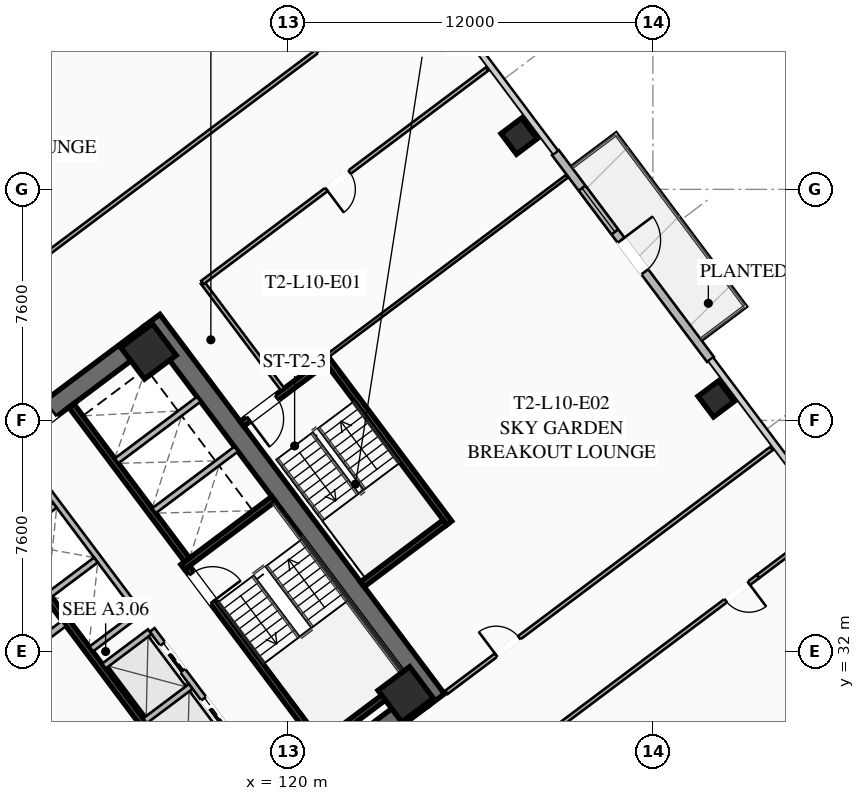
"""IFC4 building model, lengths in metres.
Left out: names, types, materials, properties, quantities, classifications, styles, units other than length and angle.
Written with IfcOpenShell. Run it as: python <this file> out.ifc"""

import sys

from ifc_helpers import new_model, si_unit, direction, frame, frame_2d, origin, origin_2d, place, context, subcontext, project, spatial, rectangle, hollow_rectangle, extrude, element, fill, save


model = new_model("IFC4")
c1 = context("Model", 3, precision=1e-05, world=origin(), true_north=direction((0.0, 1.0)))
c2 = subcontext(c1, "Body", "Model", "MODEL_VIEW")
j1 = project(units=[si_unit("LENGTHUNIT", "METRE"), si_unit("PLANEANGLEUNIT", "RADIAN")], contexts=[c1])
p1 = place(None, origin())
s1 = spatial("IfcSite", under=j1, at=p1, CompositionType="ELEMENT")
p2 = place(p1, origin())
s2 = spatial("IfcBuilding", under=s1, at=p2, CompositionType="ELEMENT")
p3 = place(p2, frame((0.0, 0.0, 42.35)))
s3 = spatial("IfcBuildingStorey", under=s2, at=p3, CompositionType="ELEMENT", Elevation=42.35)
for number, where, z_axis, x_axis in (
    (1, (112.476, 21.107, 0.0), (0.0, 0.0, 1.0), (-0.6, 0.8, 0.0)),
    (2, (115.524, 42.893, 0.0), (0.0, 0.0, 1.0), (0.6, -0.8, 0.0)),
):
    element("IfcWall", number, at=place(p3, frame(where, z_axis=z_axis, x_axis=x_axis)), inside=s3, PredefinedType="SHEAR", context=c2, shape_type="SweptSolid", body=[
        extrude(rectangle(XDim=15.6, YDim=0.65, at=frame_2d((7.8, 0.0))), origin(), (0.0, 0.0, 1.0), 3.55),
    ])
p4 = place(p3, frame((124.429, 30.478, 0.0), z_axis=(0.0, 0.0, 1.0), x_axis=(-0.799998028465, -0.600002628705, 0.0)))
e3 = element("IfcWall", 3, at=p4, inside=s3, PredefinedType="SHEAR", context=c2, shape_type="SweptSolid", body=[
    extrude(rectangle(XDim=14.86, YDim=0.65, at=frame_2d((7.43, 0.0))), origin(), (0.0, 0.0, 1.0), 3.55),
])
p5 = place(p4, frame((9.13, 0.0, 0.0)))
e4 = element("IfcOpeningElement", 4, at=p5, cuts=e3, PredefinedType="OPENING", context=c2, shape_type="SweptSolid", body=[
    extrude(rectangle(XDim=1.25, YDim=2.25, at=frame_2d((0.625, 1.125))), frame((0.0, 0.335, 0.0), z_axis=(0.0, -1.0, 0.0), x_axis=(1.0, 0.0, 0.0)), (0.0, 0.0, 1.0), 0.67),
])
p6 = place(p4, frame((4.08, 0.0, 0.0)))
e5 = element("IfcOpeningElement", 5, at=p6, cuts=e3, PredefinedType="OPENING", context=c2, shape_type="SweptSolid", body=[
    extrude(rectangle(XDim=1.25, YDim=2.25, at=frame_2d((0.625, 1.125))), frame((0.0, 0.335, 0.0), z_axis=(0.0, -1.0, 0.0), x_axis=(1.0, 0.0, 0.0)), (0.0, 0.0, 1.0), 0.67),
])
p7 = place(p3, frame((103.571, 33.522, 0.0), z_axis=(0.0, 0.0, 1.0), x_axis=(0.799998028465, 0.600002628705, 0.0)))
e6 = element("IfcWall", 6, at=p7, inside=s3, PredefinedType="SHEAR", context=c2, shape_type="SweptSolid", body=[
    extrude(rectangle(XDim=14.86, YDim=0.65, at=frame_2d((7.43, 0.0))), origin(), (0.0, 0.0, 1.0), 3.55),
])
p8 = place(p7, frame((4.48, 0.0, 0.0)))
e7 = element("IfcOpeningElement", 7, at=p8, cuts=e6, PredefinedType="OPENING", context=c2, shape_type="SweptSolid", body=[
    extrude(rectangle(XDim=1.25, YDim=2.25, at=frame_2d((0.625, 1.125))), frame((0.0, 0.335, 0.0), z_axis=(0.0, -1.0, 0.0), x_axis=(1.0, 0.0, 0.0)), (0.0, 0.0, 1.0), 0.67),
])
p9 = place(p7, frame((9.53, 0.0, 0.0)))
e8 = element("IfcOpeningElement", 8, at=p9, cuts=e6, PredefinedType="OPENING", context=c2, shape_type="SweptSolid", body=[
    extrude(rectangle(XDim=1.25, YDim=2.25, at=frame_2d((0.625, 1.125))), frame((0.0, 0.335, 0.0), z_axis=(0.0, -1.0, 0.0), x_axis=(1.0, 0.0, 0.0)), (0.0, 0.0, 1.0), 0.67),
])
for number, where, z_axis, x_axis in (
    (9, (123.87, 30.59, 0.0), (0.0, 0.0, 1.0), (0.8, 0.6, 0.0)),
    (10, (115.41, 41.87, 0.0), (0.0, 0.0, 1.0), (0.8, 0.6, 0.0)),
):
    element("IfcColumn", number, at=place(p3, frame(where, z_axis=z_axis, x_axis=x_axis)), inside=s3, PredefinedType="COLUMN", context=c2, shape_type="SweptSolid", body=[
        extrude(hollow_rectangle(XDim=1.3, YDim=1.3, WallThickness=0.05, at=origin_2d()), origin(), (0.0, 0.0, 1.0), 3.35),
    ])
for number, where, z_axis, x_axis in (
    (11, (134.08, 40.31, 0.0), (0.0, 0.0, 1.0), (0.8, 0.6, 0.0)),
    (12, (127.6, 48.95, 0.0), (0.0, 0.0, 1.0), (0.8, 0.6, 0.0)),
):
    element("IfcColumn", number, at=place(p3, frame(where, z_axis=z_axis, x_axis=x_axis)), inside=s3, PredefinedType="COLUMN", context=c2, shape_type="SweptSolid", body=[
        extrude(hollow_rectangle(XDim=0.85, YDim=0.85, WallThickness=0.035, at=origin_2d()), origin(), (0.0, 0.0, 1.0), 3.35),
    ])
p10 = place(p3, frame((128.794, 48.408, 0.0), z_axis=(0.0, 0.0, 1.0), x_axis=(0.600004595526, -0.799996553335, 0.0)))
e13 = element("IfcWall", 13, at=p10, inside=s3, PredefinedType="SOLIDWALL", context=c2, shape_type="SweptSolid", body=[
    extrude(rectangle(XDim=8.5, YDim=0.28, at=frame_2d((4.25, 0.0))), origin(), (0.0, 0.0, 1.0), 3.35),
])
p11 = place(p10, frame((3.6, 0.0, 0.0)))
e14 = element("IfcOpeningElement", 14, at=p11, cuts=e13, PredefinedType="OPENING", context=c2, shape_type="SweptSolid", body=[
    extrude(rectangle(XDim=1.3, YDim=2.15, at=frame_2d((0.65, 1.075))), frame((0.0, 0.15, 0.0), z_axis=(0.0, -1.0, 0.0), x_axis=(1.0, 0.0, 0.0)), (0.0, 0.0, 1.0), 0.3),
])
p12 = place(p10, frame((1.46, 0.0, 0.85)))
e15 = element("IfcOpeningElement", 15, at=p12, cuts=e13, PredefinedType="OPENING", context=c2, shape_type="SweptSolid", body=[
    extrude(rectangle(XDim=1.8, YDim=1.92, at=frame_2d((0.9, 0.96))), frame((0.0, 0.15, 0.0), z_axis=(0.0, -1.0, 0.0), x_axis=(1.0, 0.0, 0.0)), (0.0, 0.0, 1.0), 0.3),
])
p13 = place(p3, frame((116.56, 34.92, 0.0), z_axis=(0.0, 0.0, 1.0), x_axis=(0.600009827119, -0.799992629566, 0.0)))
e16 = element("IfcWall", 16, at=p13, inside=s3, PredefinedType="SHEAR", context=c2, shape_type="SweptSolid", body=[
    extrude(rectangle(XDim=7.95, YDim=0.2, at=frame_2d((3.975, 0.0))), origin(), (0.0, 0.0, 1.0), 3.35),
])
p14 = place(p13, frame((0.45, 0.0, 0.0)))
e17 = element("IfcOpeningElement", 17, at=p14, cuts=e16, PredefinedType="OPENING", context=c2, shape_type="SweptSolid", body=[
    extrude(rectangle(XDim=1.15, YDim=2.2, at=frame_2d((0.575, 1.1))), frame((0.0, 0.11, 0.0), z_axis=(0.0, -1.0, 0.0), x_axis=(1.0, 0.0, 0.0)), (0.0, 0.0, 1.0), 0.22),
])
for number, where, z_axis, x_axis in (
    (18, (116.54, 34.78, 0.0), (0.0, 0.0, 1.0), (0.8, 0.6, 0.0)),
    (19, (120.98, 28.86, 0.0), (0.0, 0.0, 1.0), (0.8, 0.6, 0.0)),
):
    element("IfcWall", number, at=place(p3, frame(where, z_axis=z_axis, x_axis=x_axis)), inside=s3, PredefinedType="SHEAR", context=c2, shape_type="SweptSolid", body=[
        extrude(rectangle(XDim=3.73, YDim=0.2, at=frame_2d((1.865, 0.0))), origin(), (0.0, 0.0, 1.0), 3.35),
    ])
p15 = place(p3, frame((117.938, 26.016, 0.0), z_axis=(0.0, 0.0, 1.0), x_axis=(-0.600005463273, 0.799995902516, 0.0)))
e20 = element("IfcWall", 20, at=p15, inside=s3, PredefinedType="SHEAR", context=c2, shape_type="SweptSolid", body=[
    extrude(rectangle(XDim=14.3, YDim=0.2, at=frame_2d((7.15, 0.0))), origin(), (0.0, 0.0, 1.0), 3.35),
])
p16 = place(p3, frame((110.104, 31.028, 0.0), z_axis=(0.0, 0.0, 1.0), x_axis=(0.800018601094, 0.59997519774, 0.0)))
e21 = element("IfcWall", 21, at=p16, inside=s3, PredefinedType="SOLIDWALL", context=c2, shape_type="SweptSolid", body=[
    extrude(rectangle(XDim=3.15, YDim=0.22, at=frame_2d((1.575, 0.0))), origin(), (0.0, 0.0, 1.0), 2.703),
])
p17 = place(p16, frame((1.1, 0.0, 0.0)))
e22 = element("IfcOpeningElement", 22, at=p17, cuts=e21, PredefinedType="OPENING", context=c2, shape_type="SweptSolid", body=[
    extrude(rectangle(XDim=0.95, YDim=2.05, at=frame_2d((0.475, 1.025))), frame((0.0, 0.12, 0.0), z_axis=(0.0, -1.0, 0.0), x_axis=(1.0, 0.0, 0.0)), (0.0, 0.0, 1.0), 0.24),
])
p18 = place(p3, frame((112.87, 40.09, 0.0), z_axis=(0.0, 0.0, 1.0), x_axis=(0.599975393228, -0.800018454488, 0.0)))
e23 = element("IfcWall", 23, at=p18, inside=s3, PredefinedType="SHEAR", context=c2, shape_type="SweptSolid", body=[
    extrude(rectangle(XDim=6.35, YDim=0.2, at=frame_2d((3.175, 0.0))), origin(), (0.0, 0.0, 1.0), 3.35),
])
for number, where, z_axis, x_axis in (
    (24, (115.59, 36.63, 0.0), (0.0, 0.0, 1.0), (0.8, 0.6, 0.0)),
    (25, (114.36, 38.27, 0.0), (0.0, 0.0, 1.0), (0.8, 0.6, 0.0)),
):
    element("IfcWall", number, at=place(p3, frame(where, z_axis=z_axis, x_axis=x_axis)), inside=s3, PredefinedType="SOLIDWALL", context=c2, shape_type="SweptSolid", body=[
        extrude(rectangle(XDim=3.38, YDim=0.2, at=frame_2d((1.69, 0.0))), origin(), (0.0, 0.0, 1.0), 3.35),
    ])
p19 = place(p3, frame((119.61, 27.27, 0.0), z_axis=(0.0, 0.0, 1.0), x_axis=(-0.600011488909, 0.79999138319, 0.0)))
e26 = element("IfcWall", 26, at=p19, inside=s3, PredefinedType="SOLIDWALL", context=c2, shape_type="SweptSolid", body=[
    extrude(rectangle(XDim=6.8, YDim=0.2, at=frame_2d((3.4, 0.0))), origin(), (0.0, 0.0, 1.0), 3.35),
])
p20 = place(p19, frame((0.625, 0.0, 0.0)))
e27 = element("IfcOpeningElement", 27, at=p20, cuts=e26, PredefinedType="OPENING", context=c2, shape_type="SweptSolid", body=[
    extrude(rectangle(XDim=1.1, YDim=2.2, at=frame_2d((0.55, 1.1))), frame((0.0, 0.11, 0.0), z_axis=(0.0, -1.0, 0.0), x_axis=(1.0, 0.0, 0.0)), (0.0, 0.0, 1.0), 0.22),
])
p21 = place(p19, frame((2.875, 0.0, 0.0)))
e28 = element("IfcOpeningElement", 28, at=p21, cuts=e26, PredefinedType="OPENING", context=c2, shape_type="SweptSolid", body=[
    extrude(rectangle(XDim=1.1, YDim=2.2, at=frame_2d((0.55, 1.1))), frame((0.0, 0.11, 0.0), z_axis=(0.0, -1.0, 0.0), x_axis=(1.0, 0.0, 0.0)), (0.0, 0.0, 1.0), 0.22),
])
p22 = place(p19, frame((5.125, 0.0, 0.0)))
e29 = element("IfcOpeningElement", 29, at=p22, cuts=e26, PredefinedType="OPENING", context=c2, shape_type="SweptSolid", body=[
    extrude(rectangle(XDim=1.1, YDim=2.2, at=frame_2d((0.55, 1.1))), frame((0.0, 0.11, 0.0), z_axis=(0.0, -1.0, 0.0), x_axis=(1.0, 0.0, 0.0)), (0.0, 0.0, 1.0), 0.22),
])
p23 = place(p3, frame((115.296, 29.722, 0.0), z_axis=(0.0, 0.0, 1.0), x_axis=(0.799984418148, 0.600020775241, 0.0)))
e30 = element("IfcWall", 30, at=p23, inside=s3, PredefinedType="SOLIDWALL", context=c2, shape_type="SweptSolid", body=[
    extrude(rectangle(XDim=1.88, YDim=0.2, at=frame_2d((0.94, 0.0))), origin(), (0.0, 0.0, 1.0), 3.35),
])
p24 = place(p3, frame((113.946, 31.522, 0.0), z_axis=(0.0, 0.0, 1.0), x_axis=(0.8, 0.6, 0.0)))
e31 = element("IfcWall", 31, at=p24, inside=s3, PredefinedType="SOLIDWALL", context=c2, shape_type="SweptSolid", body=[
    extrude(rectangle(XDim=1.88, YDim=0.2, at=frame_2d((0.94, 0.0))), origin(), (0.0, 0.0, 1.0), 3.35),
])
p25 = place(p3, frame((115.11, 33.27, 0.0), z_axis=(0.0, 0.0, 1.0), x_axis=(-0.600011488909, 0.79999138319, 0.0)))
e32 = element("IfcWall", 32, at=p25, inside=s3, PredefinedType="SOLIDWALL", context=c2, shape_type="SweptSolid", body=[
    extrude(rectangle(XDim=6.8, YDim=0.2, at=frame_2d((3.4, 0.0))), origin(), (0.0, 0.0, 1.0), 3.35),
])
p26 = place(p3, frame((113.526, 32.082, 0.0), z_axis=(0.0, 0.0, 1.0), x_axis=(0.800046745961, 0.599937666993, 0.0)))
e33 = element("IfcWall", 33, at=p26, inside=s3, PredefinedType="SOLIDWALL", context=c2, shape_type="SweptSolid", body=[
    extrude(rectangle(XDim=1.88, YDim=0.2, at=frame_2d((0.94, 0.0))), origin(), (0.0, 0.0, 1.0), 3.35),
])
p27 = place(p3, frame((112.176, 33.882, 0.0), z_axis=(0.0, 0.0, 1.0), x_axis=(0.8, 0.6, 0.0)))
e34 = element("IfcWall", 34, at=p27, inside=s3, PredefinedType="SOLIDWALL", context=c2, shape_type="SweptSolid", body=[
    extrude(rectangle(XDim=1.88, YDim=0.2, at=frame_2d((0.94, 0.0))), origin(), (0.0, 0.0, 1.0), 3.35),
])
p28 = place(p3, frame((110.826, 35.682, 0.0), z_axis=(0.0, 0.0, 1.0), x_axis=(0.799984418148, 0.600020775241, 0.0)))
e35 = element("IfcWall", 35, at=p28, inside=s3, PredefinedType="SOLIDWALL", context=c2, shape_type="SweptSolid", body=[
    extrude(rectangle(XDim=1.88, YDim=0.2, at=frame_2d((0.94, 0.0))), origin(), (0.0, 0.0, 1.0), 3.35),
])
p29 = place(p3, frame((125.304, 36.228, 0.0), z_axis=(0.0, 0.0, 1.0), x_axis=(-0.59998851072, 0.800008616831, 0.0)))
e36 = element("IfcWall", 36, at=p29, inside=s3, PredefinedType="SHEAR", context=c2, shape_type="SweptSolid", body=[
    extrude(rectangle(XDim=6.8, YDim=0.2, at=frame_2d((3.4, 0.0))), origin(), (0.0, 0.0, 1.0), 3.35),
])
p30 = place(p3, frame((121.204, 41.528, 0.0), z_axis=(0.0, 0.0, 1.0), x_axis=(-0.800017232136, -0.599977023131, 0.0)))
e37 = element("IfcWall", 37, at=p30, inside=s3, PredefinedType="SHEAR", context=c2, shape_type="SweptSolid", body=[
    extrude(rectangle(XDim=3.4, YDim=0.2, at=frame_2d((1.7, 0.0))), origin(), (0.0, 0.0, 1.0), 3.35),
])
p31 = place(p30, frame((1.975, 0.0, 0.0)))
e38 = element("IfcOpeningElement", 38, at=p31, cuts=e37, PredefinedType="OPENING", context=c2, shape_type="SweptSolid", body=[
    extrude(rectangle(XDim=1.15, YDim=2.2, at=frame_2d((0.575, 1.1))), frame((0.0, 0.11, 0.0), z_axis=(0.0, -1.0, 0.0), x_axis=(1.0, 0.0, 0.0)), (0.0, 0.0, 1.0), 0.22),
])
p32 = place(p3, frame((122.444, 34.208, 0.0), z_axis=(0.0, 0.0, 1.0), x_axis=(0.79999138319, 0.600011488909, 0.0)))
e39 = element("IfcWall", 39, at=p32, inside=s3, PredefinedType="SHEAR", context=c2, shape_type="SweptSolid", body=[
    extrude(rectangle(XDim=3.4, YDim=0.2, at=frame_2d((1.7, 0.0))), origin(), (0.0, 0.0, 1.0), 3.35),
])
p33 = place(p3, frame((119.824, 40.618, 0.0), z_axis=(0.0, 0.0, 1.0), x_axis=(-0.599982243973, 0.800013316712, 0.0)))
e40 = element("IfcWall", 40, at=p33, inside=s3, PredefinedType="PARTITIONING", context=c2, shape_type="SweptSolid", body=[
    extrude(rectangle(XDim=4.4, YDim=0.135, at=frame_2d((2.2, 0.0))), origin(), (0.0, 0.0, 1.0), 2.703),
])
p34 = place(p3, frame((98.084, 34.588, 0.0), z_axis=(0.0, 0.0, 1.0), x_axis=(0.799997053619, 0.600003928488, 0.0)))
e41 = element("IfcWall", 41, at=p34, inside=s3, PredefinedType="PARTITIONING", context=c2, shape_type="SweptSolid", body=[
    extrude(rectangle(XDim=29.83, YDim=0.135, at=frame_2d((14.915, 0.0))), origin(), (0.0, 0.0, 1.0), 2.703),
])
p35 = place(p34, frame((0.3, 0.0, 0.0)))
e42 = element("IfcOpeningElement", 42, at=p35, cuts=e41, PredefinedType="OPENING", context=c2, shape_type="SweptSolid", body=[
    extrude(rectangle(XDim=0.95, YDim=2.05, at=frame_2d((0.475, 1.025))), frame((0.0, 0.077, 0.0), z_axis=(0.0, -1.0, 0.0), x_axis=(1.0, 0.0, 0.0)), (0.0, 0.0, 1.0), 0.155),
])
p36 = place(p34, frame((28.58, 0.0, 0.0)))
e43 = element("IfcOpeningElement", 43, at=p36, cuts=e41, PredefinedType="OPENING", context=c2, shape_type="SweptSolid", body=[
    extrude(rectangle(XDim=0.95, YDim=2.05, at=frame_2d((0.475, 1.025))), frame((0.0, 0.077, 0.0), z_axis=(0.0, -1.0, 0.0), x_axis=(1.0, 0.0, 0.0)), (0.0, 0.0, 1.0), 0.155),
])
p37 = place(p3, frame((135.46, 34.47, 0.0), z_axis=(0.0, 0.0, 1.0), x_axis=(-0.800000982127, -0.599998690494, 0.0)))
e44 = element("IfcWall", 44, at=p37, inside=s3, PredefinedType="PARTITIONING", context=c2, shape_type="SweptSolid", body=[
    extrude(rectangle(XDim=29.83, YDim=0.135, at=frame_2d((14.915, 0.0))), origin(), (0.0, 0.0, 1.0), 2.703),
])
p38 = place(p37, frame((28.5, 0.0, 0.0)))
e45 = element("IfcOpeningElement", 45, at=p38, cuts=e44, PredefinedType="OPENING", context=c2, shape_type="SweptSolid", body=[
    extrude(rectangle(XDim=0.95, YDim=2.05, at=frame_2d((0.475, 1.025))), frame((0.0, 0.077, 0.0), z_axis=(0.0, -1.0, 0.0), x_axis=(1.0, 0.0, 0.0)), (0.0, 0.0, 1.0), 0.155),
])
p39 = place(p37, frame((17.901, 0.0, 0.0)))
e46 = element("IfcOpeningElement", 46, at=p39, cuts=e44, PredefinedType="OPENING", context=c2, shape_type="SweptSolid", body=[
    extrude(rectangle(XDim=0.95, YDim=2.05, at=frame_2d((0.475, 1.025))), frame((0.0, 0.077, 0.0), z_axis=(0.0, -1.0, 0.0), x_axis=(1.0, 0.0, 0.0)), (0.0, 0.0, 1.0), 0.155),
])
p40 = place(p37, frame((13.92, 0.0, 0.0)))
e47 = element("IfcOpeningElement", 47, at=p40, cuts=e44, PredefinedType="OPENING", context=c2, shape_type="SweptSolid", body=[
    extrude(rectangle(XDim=0.95, YDim=2.05, at=frame_2d((0.475, 1.025))), frame((0.0, 0.077, 0.0), z_axis=(0.0, -1.0, 0.0), x_axis=(1.0, 0.0, 0.0)), (0.0, 0.0, 1.0), 0.155),
])
p41 = place(p37, frame((0.38, 0.0, 0.0)))
e48 = element("IfcOpeningElement", 48, at=p41, cuts=e44, PredefinedType="OPENING", context=c2, shape_type="SweptSolid", body=[
    extrude(rectangle(XDim=0.95, YDim=2.05, at=frame_2d((0.475, 1.025))), frame((0.0, 0.077, 0.0), z_axis=(0.0, -1.0, 0.0), x_axis=(1.0, 0.0, 0.0)), (0.0, 0.0, 1.0), 0.155),
])
p42 = place(p3, frame((135.46, 34.47, 0.0), z_axis=(0.0, 0.0, 1.0), x_axis=(0.799990331366, 0.600012891296, 0.0)))
e49 = element("IfcWall", 49, at=p42, inside=s3, PredefinedType="PARTITIONING", context=c2, shape_type="SweptSolid", body=[
    extrude(rectangle(XDim=3.03, YDim=0.135, at=frame_2d((1.515, 0.0))), origin(), (0.0, 0.0, 1.0), 2.703),
])
p43 = place(p3, frame((126.544, 51.158, 0.0), z_axis=(0.0, 0.0, 1.0), x_axis=(-0.799994991918, -0.600006677385, 0.0)))
e50 = element("IfcWall", 50, at=p43, inside=s3, PredefinedType="PARTITIONING", context=c2, shape_type="SweptSolid", body=[
    extrude(rectangle(XDim=11.7, YDim=0.135, at=frame_2d((5.85, 0.0))), origin(), (0.0, 0.0, 1.0), 2.703),
])
p44 = place(p43, frame((5.65, 0.0, 0.0)))
e51 = element("IfcOpeningElement", 51, at=p44, cuts=e50, PredefinedType="OPENING", context=c2, shape_type="SweptSolid", body=[
    extrude(rectangle(XDim=0.95, YDim=2.05, at=frame_2d((0.475, 1.025))), frame((0.0, 0.077, 0.0), z_axis=(0.0, -1.0, 0.0), x_axis=(1.0, 0.0, 0.0)), (0.0, 0.0, 1.0), 0.155),
])
p45 = place(p3, frame((125.208, 30.656, 0.0), z_axis=(0.0, 0.0, 1.0), x_axis=(0.800002191231, 0.599997078347, 0.0)))
e52 = element("IfcWall", 52, at=p45, inside=s3, PredefinedType="PARTITIONING", context=c2, shape_type="SweptSolid", body=[
    extrude(rectangle(XDim=13.37, YDim=0.135, at=frame_2d((6.685, 0.0))), origin(), (0.0, 0.0, 1.0), 2.703),
])
p46 = place(p45, frame((2.045, 0.0, 0.0)))
e53 = element("IfcOpeningElement", 53, at=p46, cuts=e52, PredefinedType="OPENING", context=c2, shape_type="SweptSolid", body=[
    extrude(rectangle(XDim=0.95, YDim=2.05, at=frame_2d((0.475, 1.025))), frame((0.0, 0.077, 0.0), z_axis=(0.0, -1.0, 0.0), x_axis=(1.0, 0.0, 0.0)), (0.0, 0.0, 1.0), 0.155),
])
p47 = place(p3, frame((129.184, 47.638, 0.0), z_axis=(0.0, 0.0, 1.0), x_axis=(-0.800008922773, -0.599988102785, 0.0)))
e54 = element("IfcWall", 54, at=p47, inside=s3, PredefinedType="PARTITIONING", context=c2, shape_type="SweptSolid", body=[
    extrude(rectangle(XDim=9.85, YDim=0.11, at=frame_2d((4.925, 0.0))), origin(), (0.0, 0.0, 1.0), 2.703),
])
p48 = place(p11, origin())
e55 = element("IfcDoor", 55, at=p48, inside=s3, OperationType="SINGLE_SWING_LEFT", PredefinedType="DOOR", context=c2, shape_type="SweptSolid", body=[
    extrude(rectangle(XDim=1.3, YDim=2.15, at=frame_2d((0.65, 1.075))), frame((0.0, 0.025, 0.0), z_axis=(0.0, -1.0, 0.0), x_axis=(1.0, 0.0, 0.0)), (0.0, 0.0, 1.0), 0.05),
])
fill(e14, e55)
p49 = place(p12, origin())
e56 = element("IfcWindow", 56, at=p49, inside=s3, PartitioningType="SINGLE_PANEL", PredefinedType="WINDOW", context=c2, shape_type="SweptSolid", body=[
    extrude(rectangle(XDim=1.8, YDim=1.92, at=frame_2d((0.9, 0.96))), frame((0.0, 0.03, 0.0), z_axis=(0.0, -1.0, 0.0), x_axis=(1.0, 0.0, 0.0)), (0.0, 0.0, 1.0), 0.06),
])
fill(e15, e56)
p50 = place(p14, origin())
e57 = element("IfcDoor", 57, at=p50, inside=s3, OperationType="SINGLE_SWING_RIGHT", PredefinedType="DOOR", context=c2, shape_type="SweptSolid", body=[
    extrude(rectangle(XDim=1.15, YDim=2.2, at=frame_2d((0.575, 1.1))), frame((0.0, 0.025, 0.0), z_axis=(0.0, -1.0, 0.0), x_axis=(1.0, 0.0, 0.0)), (0.0, 0.0, 1.0), 0.05),
])
fill(e17, e57)
p51 = place(p31, origin())
e58 = element("IfcDoor", 58, at=p51, inside=s3, OperationType="SINGLE_SWING_RIGHT", PredefinedType="DOOR", context=c2, shape_type="SweptSolid", body=[
    extrude(rectangle(XDim=1.15, YDim=2.2, at=frame_2d((0.575, 1.1))), frame((0.0, 0.025, 0.0), z_axis=(0.0, -1.0, 0.0), x_axis=(1.0, 0.0, 0.0)), (0.0, 0.0, 1.0), 0.05),
])
fill(e38, e58)
p52 = place(p36, origin())
e59 = element("IfcDoor", 59, at=p52, inside=s3, OperationType="SINGLE_SWING_LEFT", PredefinedType="DOOR", context=c2, shape_type="SweptSolid", body=[
    extrude(rectangle(XDim=0.95, YDim=2.05, at=frame_2d((0.475, 1.025))), frame((0.0, 0.025, 0.0), z_axis=(0.0, -1.0, 0.0), x_axis=(1.0, 0.0, 0.0)), (0.0, 0.0, 1.0), 0.05),
])
fill(e43, e59)
p53 = place(p41, origin())
e60 = element("IfcDoor", 60, at=p53, inside=s3, OperationType="SINGLE_SWING_LEFT", PredefinedType="DOOR", context=c2, shape_type="SweptSolid", body=[
    extrude(rectangle(XDim=0.95, YDim=2.05, at=frame_2d((0.475, 1.025))), frame((0.0, 0.025, 0.0), z_axis=(0.0, -1.0, 0.0), x_axis=(1.0, 0.0, 0.0)), (0.0, 0.0, 1.0), 0.05),
])
fill(e48, e60)
p54 = place(p44, origin())
e61 = element("IfcDoor", 61, at=p54, inside=s3, OperationType="SINGLE_SWING_RIGHT", PredefinedType="DOOR", context=c2, shape_type="SweptSolid", body=[
    extrude(rectangle(XDim=0.95, YDim=2.05, at=frame_2d((0.475, 1.025))), frame((0.0, 0.025, 0.0), z_axis=(0.0, -1.0, 0.0), x_axis=(1.0, 0.0, 0.0)), (0.0, 0.0, 1.0), 0.05),
])
fill(e51, e61)
p55 = place(p46, origin())
e62 = element("IfcDoor", 62, at=p55, inside=s3, OperationType="SINGLE_SWING_LEFT", PredefinedType="DOOR", context=c2, shape_type="SweptSolid", body=[
    extrude(rectangle(XDim=0.95, YDim=2.05, at=frame_2d((0.475, 1.025))), frame((0.0, 0.025, 0.0), z_axis=(0.0, -1.0, 0.0), x_axis=(1.0, 0.0, 0.0)), (0.0, 0.0, 1.0), 0.05),
])
fill(e53, e62)
p56 = place(p21, origin())
e63 = element("IfcDoor", 63, at=p56, inside=s3, OperationType="SLIDING_TO_LEFT", PredefinedType="DOOR", context=c2, shape_type="SweptSolid", body=[
    extrude(rectangle(XDim=1.1, YDim=2.2, at=frame_2d((0.55, 1.1))), frame((0.0, 0.025, 0.0), z_axis=(0.0, -1.0, 0.0), x_axis=(1.0, 0.0, 0.0)), (0.0, 0.0, 1.0), 0.05),
])
fill(e28, e63)
p57 = place(p22, origin())
e64 = element("IfcDoor", 64, at=p57, inside=s3, OperationType="SLIDING_TO_LEFT", PredefinedType="DOOR", context=c2, shape_type="SweptSolid", body=[
    extrude(rectangle(XDim=1.1, YDim=2.2, at=frame_2d((0.55, 1.1))), frame((0.0, 0.025, 0.0), z_axis=(0.0, -1.0, 0.0), x_axis=(1.0, 0.0, 0.0)), (0.0, 0.0, 1.0), 0.05),
])
fill(e29, e64)
save(model, sys.argv[1])
